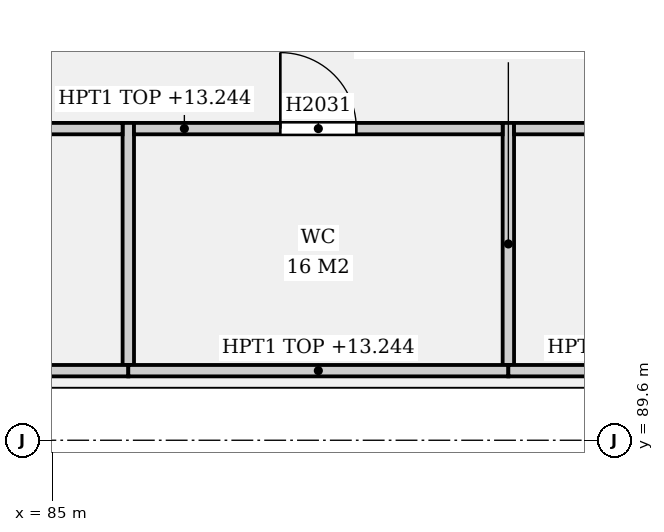
"""IFC4 building model, lengths in metres.
Left out: names, types, materials, properties, quantities, classifications, styles, units other than length and angle.
Written with IfcOpenShell. Run it as: python <this file> out.ifc"""

import sys

from ifc_helpers import new_model, si_unit, direction, frame, frame_2d, origin, place, context, subcontext, project, spatial, rectangle, extrude, element, fill, save


model = new_model("IFC4")
c1 = context("Model", 3, precision=1e-05, world=origin(), true_north=direction((0.0, 1.0)))
c2 = subcontext(c1, "Body", "Model", "MODEL_VIEW")
j1 = project(units=[si_unit("LENGTHUNIT", "METRE"), si_unit("PLANEANGLEUNIT", "RADIAN")], contexts=[c1])
p1 = place(None, origin())
s1 = spatial("IfcSite", under=j1, at=p1, CompositionType="ELEMENT")
p2 = place(p1, origin())
s2 = spatial("IfcBuilding", under=s1, at=p2, CompositionType="ELEMENT")
p3 = place(p2, frame((0.0, 0.0, 9.4)))
s3 = spatial("IfcBuildingStorey", under=s2, at=p3, CompositionType="ELEMENT", Elevation=9.4)
p4 = place(p3, frame((82.075, 93.7, 0.0), z_axis=(0.0, 0.0, 1.0), x_axis=(1.0, 0.0, 0.0)))
e1 = element("IfcWall", 1, at=p4, inside=s3, PredefinedType="PARTITIONING", context=c2, shape_type="SweptSolid", body=[
    extrude(rectangle(XDim=3.85, YDim=0.15, at=frame_2d((1.925, 0.0))), origin(), (0.0, 0.0, 1.0), 3.496),
])
p5 = place(p4, frame((1.425, 0.0, 0.0)))
e2 = element("IfcOpeningElement", 2, at=p5, cuts=e1, PredefinedType="OPENING", context=c2, shape_type="SweptSolid", body=[
    extrude(rectangle(XDim=1.0, YDim=2.1, at=frame_2d((0.5, 1.05))), frame((0.0, 0.085, 0.0), z_axis=(0.0, -1.0, 0.0), x_axis=(1.0, 0.0, 0.0)), (0.0, 0.0, 1.0), 0.17),
])
p6 = place(p3, frame((86.0, 90.59, 0.0), z_axis=(0.0, 0.0, 1.0), x_axis=(0.0, 1.0, 0.0)))
e3 = element("IfcWall", 3, at=p6, inside=s3, PredefinedType="PARTITIONING", context=c2, shape_type="SweptSolid", body=[
    extrude(rectangle(XDim=3.185, YDim=0.15, at=frame_2d((1.592, 0.0))), origin(), (0.0, 0.0, 1.0), 4.15),
])
p7 = place(p3, frame((82.0, 90.515, 0.0), z_axis=(0.0, 0.0, 1.0), x_axis=(1.0, 0.0, 0.0)))
e4 = element("IfcWall", 4, at=p7, inside=s3, PredefinedType="PARTITIONING", context=c2, shape_type="SweptSolid", body=[
    extrude(rectangle(XDim=4.0, YDim=0.15, at=frame_2d((2.0, 0.0))), origin(), (0.0, 0.0, 1.0), 3.496),
])
p8 = place(p3, frame((86.075, 93.7, 0.0), z_axis=(0.0, 0.0, 1.0), x_axis=(1.0, 0.0, 0.0)))
e5 = element("IfcWall", 5, at=p8, inside=s3, PredefinedType="PARTITIONING", context=c2, shape_type="SweptSolid", body=[
    extrude(rectangle(XDim=4.85, YDim=0.15, at=frame_2d((2.425, 0.0))), origin(), (0.0, 0.0, 1.0), 3.844),
])
p9 = place(p8, frame((1.925, 0.0, 0.0)))
e6 = element("IfcOpeningElement", 6, at=p9, cuts=e5, PredefinedType="OPENING", context=c2, shape_type="SweptSolid", body=[
    extrude(rectangle(XDim=1.0, YDim=2.1, at=frame_2d((0.5, 1.05))), frame((0.0, 0.085, 0.0), z_axis=(0.0, -1.0, 0.0), x_axis=(1.0, 0.0, 0.0)), (0.0, 0.0, 1.0), 0.17),
])
p10 = place(p3, frame((91.0, 90.59, 0.0), z_axis=(0.0, 0.0, 1.0), x_axis=(0.0, 1.0, 0.0)))
e7 = element("IfcWall", 7, at=p10, inside=s3, PredefinedType="PARTITIONING", context=c2, shape_type="SweptSolid", body=[
    extrude(rectangle(XDim=3.185, YDim=0.15, at=frame_2d((1.592, 0.0))), origin(), (0.0, 0.0, 1.0), 4.15),
])
p11 = place(p3, frame((86.0, 90.515, 0.0), z_axis=(0.0, 0.0, 1.0), x_axis=(1.0, 0.0, 0.0)))
e8 = element("IfcWall", 8, at=p11, inside=s3, PredefinedType="PARTITIONING", context=c2, shape_type="SweptSolid", body=[
    extrude(rectangle(XDim=5.0, YDim=0.15, at=frame_2d((2.5, 0.0))), origin(), (0.0, 0.0, 1.0), 3.844),
])
p12 = place(p3, frame((91.075, 93.7, 0.0), z_axis=(0.0, 0.0, 1.0), x_axis=(1.0, 0.0, 0.0)))
e9 = element("IfcWall", 9, at=p12, inside=s3, PredefinedType="PARTITIONING", context=c2, shape_type="SweptSolid", body=[
    extrude(rectangle(XDim=4.85, YDim=0.15, at=frame_2d((2.425, 0.0))), origin(), (0.0, 0.0, 1.0), 3.496),
])
p13 = place(p12, frame((1.925, 0.0, 0.0)))
e10 = element("IfcOpeningElement", 10, at=p13, cuts=e9, PredefinedType="OPENING", context=c2, shape_type="SweptSolid", body=[
    extrude(rectangle(XDim=1.0, YDim=2.1, at=frame_2d((0.5, 1.05))), frame((0.0, 0.085, 0.0), z_axis=(0.0, -1.0, 0.0), x_axis=(1.0, 0.0, 0.0)), (0.0, 0.0, 1.0), 0.17),
])
p14 = place(p3, frame((91.0, 90.515, 0.0), z_axis=(0.0, 0.0, 1.0), x_axis=(1.0, 0.0, 0.0)))
e11 = element("IfcWall", 11, at=p14, inside=s3, PredefinedType="PARTITIONING", context=c2, shape_type="SweptSolid", body=[
    extrude(rectangle(XDim=5.0, YDim=0.15, at=frame_2d((2.5, 0.0))), origin(), (0.0, 0.0, 1.0), 3.496),
])
p15 = place(p9, origin())
e12 = element("IfcDoor", 12, at=p15, inside=s3, OperationType="SINGLE_SWING_LEFT", PredefinedType="DOOR", context=c2, shape_type="SweptSolid", body=[
    extrude(rectangle(XDim=1.0, YDim=2.1, at=frame_2d((0.5, 1.05))), frame((0.0, 0.025, 0.0), z_axis=(0.0, -1.0, 0.0), x_axis=(1.0, 0.0, 0.0)), (0.0, 0.0, 1.0), 0.05),
])
fill(e6, e12)
save(model, sys.argv[1])
